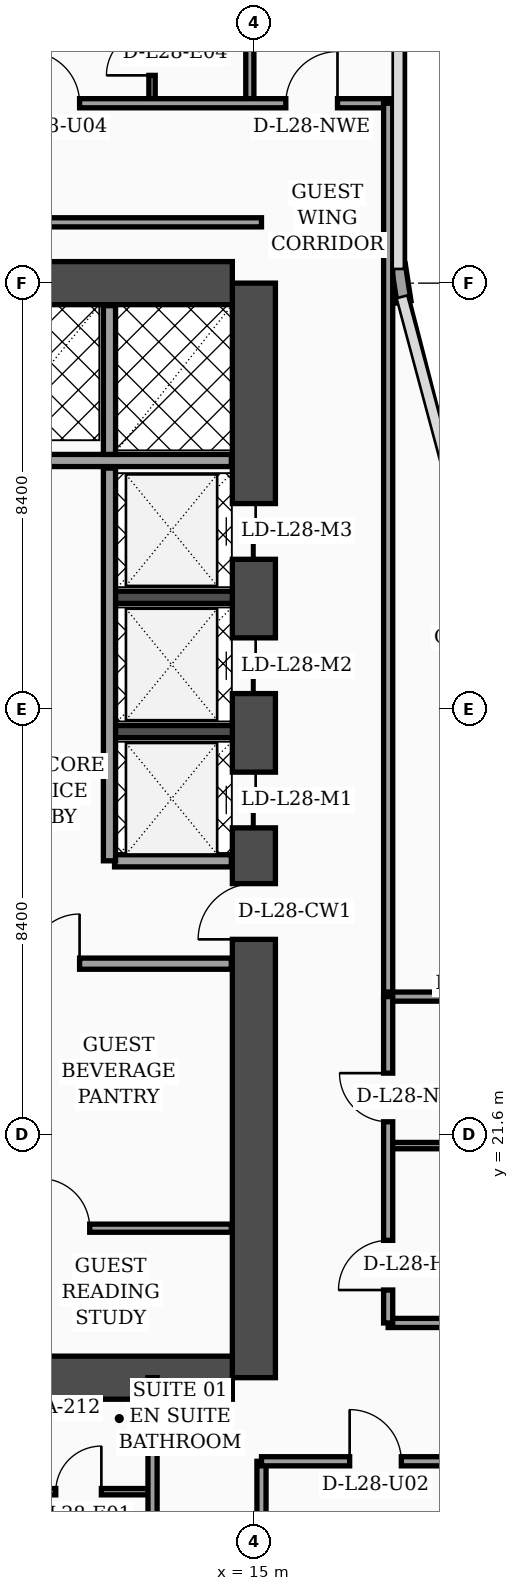
"""IFC4 building model, lengths in metres.
Left out: names, types, materials, properties, quantities, classifications, styles, units other than length and angle.
Written with IfcOpenShell. Run it as: python <this file> out.ifc"""

import sys

from ifc_helpers import new_model, si_unit, direction, frame, frame_2d, origin, place, context, subcontext, project, spatial, rectangle, extrude, element, fill, save


model = new_model("IFC4")
c1 = context("Model", 3, precision=1e-05, world=origin(), true_north=direction((0.0, 1.0)))
c2 = subcontext(c1, "Body", "Model", "MODEL_VIEW")
j1 = project(units=[si_unit("LENGTHUNIT", "METRE"), si_unit("PLANEANGLEUNIT", "RADIAN")], contexts=[c1])
p1 = place(None, origin())
s1 = spatial("IfcSite", under=j1, at=p1, CompositionType="ELEMENT")
p2 = place(p1, origin())
s2 = spatial("IfcBuilding", under=s1, at=p2, CompositionType="ELEMENT")
p3 = place(p2, frame((0.0, 0.0, 116.4)))
s3 = spatial("IfcBuildingStorey", under=s2, at=p3, CompositionType="ELEMENT", Elevation=116.4)
p4 = place(p3, frame((15.0, 16.8, 0.0), z_axis=(0.0, 0.0, 1.0), x_axis=(0.0, 1.0, 0.0)))
e1 = element("IfcWall", 1, at=p4, inside=s3, PredefinedType="SHEAR", context=c2, shape_type="SweptSolid", body=[
    extrude(rectangle(XDim=21.6, YDim=0.85, at=frame_2d((10.8, 0.0))), origin(), (0.0, 0.0, 1.0), 3.56),
])
p5 = place(p4, frame((8.65, 0.0, 0.0)))
e2 = element("IfcOpeningElement", 2, at=p5, cuts=e1, PredefinedType="OPENING", context=c2, shape_type="SweptSolid", body=[
    extrude(rectangle(XDim=1.1, YDim=2.2, at=frame_2d((0.55, 1.1))), frame((0.0, 0.435, 0.0), z_axis=(0.0, -1.0, 0.0), x_axis=(1.0, 0.0, 0.0)), (0.0, 0.0, 1.0), 0.87),
])
p6 = place(p4, frame((10.85, 0.0, 0.0)))
e3 = element("IfcOpeningElement", 3, at=p6, cuts=e1, PredefinedType="OPENING", context=c2, shape_type="SweptSolid", body=[
    extrude(rectangle(XDim=1.1, YDim=2.2, at=frame_2d((0.55, 1.1))), frame((0.0, 0.435, 0.0), z_axis=(0.0, -1.0, 0.0), x_axis=(1.0, 0.0, 0.0)), (0.0, 0.0, 1.0), 0.87),
])
p7 = place(p4, frame((13.5, 0.0, 0.0)))
e4 = element("IfcOpeningElement", 4, at=p7, cuts=e1, PredefinedType="OPENING", context=c2, shape_type="SweptSolid", body=[
    extrude(rectangle(XDim=1.1, YDim=2.2, at=frame_2d((0.55, 1.1))), frame((0.0, 0.435, 0.0), z_axis=(0.0, -1.0, 0.0), x_axis=(1.0, 0.0, 0.0)), (0.0, 0.0, 1.0), 0.87),
])
p8 = place(p4, frame((16.15, 0.0, 0.0)))
e5 = element("IfcOpeningElement", 5, at=p8, cuts=e1, PredefinedType="OPENING", context=c2, shape_type="SweptSolid", body=[
    extrude(rectangle(XDim=1.1, YDim=2.2, at=frame_2d((0.55, 1.1))), frame((0.0, 0.435, 0.0), z_axis=(0.0, -1.0, 0.0), x_axis=(1.0, 0.0, 0.0)), (0.0, 0.0, 1.0), 0.87),
])
for number, where, z_axis, x_axis in (
    (6, (4.625, 38.4, 0.0), (0.0, 0.0, 1.0), (1.0, 0.0, 0.0)),
    (7, (4.625, 16.8, 0.0), (0.0, 0.0, 1.0), (1.0, 0.0, 0.0)),
):
    element("IfcWall", number, at=place(p3, frame(where, z_axis=z_axis, x_axis=x_axis)), inside=s3, PredefinedType="SHEAR", context=c2, shape_type="SweptSolid", body=[
        extrude(rectangle(XDim=9.95, YDim=0.85, at=frame_2d((4.975, 0.0))), origin(), (0.0, 0.0, 1.0), 3.56),
    ])
for number, where, z_axis, x_axis in (
    (8, (12.18, 29.55, 0.0), (0.0, 0.0, 1.0), (1.0, 0.0, 0.0)),
    (9, (12.18, 32.2, 0.0), (0.0, 0.0, 1.0), (1.0, 0.0, 0.0)),
):
    element("IfcWall", number, at=place(p3, frame(where, z_axis=z_axis, x_axis=x_axis)), inside=s3, PredefinedType="SOLIDWALL", context=c2, shape_type="SweptSolid", body=[
        extrude(rectangle(XDim=2.395, YDim=0.24, at=frame_2d((1.198, 0.0))), origin(), (0.0, 0.0, 1.0), 3.56),
    ])
p9 = place(p3, frame((17.962, 38.03, 0.0), z_axis=(0.0, 0.0, 1.0), x_axis=(-0.15141125477, 0.988470855377, 0.0)))
e10 = element("IfcWall", 10, at=p9, inside=s3, PredefinedType="SOLIDWALL", context=c2, shape_type="SweptSolid", body=[
    extrude(rectangle(XDim=0.739, YDim=0.28, at=frame_2d((0.369, 0.0))), origin(), (0.0, 0.0, 1.0), 3.56),
])
p10 = place(p3, frame((9.68, 19.75, 0.0), z_axis=(0.0, 0.0, 1.0), x_axis=(1.0, 0.0, 0.0)))
e11 = element("IfcWall", 11, at=p10, inside=s3, PredefinedType="PARTITIONING", context=c2, shape_type="SweptSolid", body=[
    extrude(rectangle(XDim=4.875, YDim=0.16, at=frame_2d((2.438, 0.0))), origin(), (0.0, 0.0, 1.0), 3.56),
])
p11 = place(p10, frame((1.1, 0.0, 0.0)))
e12 = element("IfcOpeningElement", 12, at=p11, cuts=e11, PredefinedType="OPENING", context=c2, shape_type="SweptSolid", body=[
    extrude(rectangle(XDim=0.98, YDim=2.15, at=frame_2d((0.49, 1.075))), frame((0.0, 0.09, 0.0), z_axis=(0.0, -1.0, 0.0), x_axis=(1.0, 0.0, 0.0)), (0.0, 0.0, 1.0), 0.18),
])
p12 = place(p3, frame((9.68, 24.97, 0.0), z_axis=(0.0, 0.0, 1.0), x_axis=(1.0, 0.0, 0.0)))
e13 = element("IfcWall", 13, at=p12, inside=s3, PredefinedType="SOLIDWALL", context=c2, shape_type="SweptSolid", body=[
    extrude(rectangle(XDim=4.875, YDim=0.22, at=frame_2d((2.438, 0.0))), origin(), (0.0, 0.0, 1.0), 2.84),
])
p13 = place(p12, frame((0.9, 0.0, 0.0)))
e14 = element("IfcOpeningElement", 14, at=p13, cuts=e13, PredefinedType="OPENING", context=c2, shape_type="SweptSolid", body=[
    extrude(rectangle(XDim=0.98, YDim=2.15, at=frame_2d((0.49, 1.075))), frame((0.0, 0.12, 0.0), z_axis=(0.0, -1.0, 0.0), x_axis=(1.0, 0.0, 0.0)), (0.0, 0.0, 1.0), 0.24),
])
p14 = place(p3, frame((12.25, 27.0, 0.0), z_axis=(0.0, 0.0, 1.0), x_axis=(1.0, 0.0, 0.0)))
e15 = element("IfcWall", 15, at=p14, inside=s3, PredefinedType="SOLIDWALL", context=c2, shape_type="SweptSolid", body=[
    extrude(rectangle(XDim=2.305, YDim=0.24, at=frame_2d((1.152, 0.0))), origin(), (0.0, 0.0, 1.0), 3.56),
])
p15 = place(p3, frame((12.15, 27.0, 0.0), z_axis=(0.0, 0.0, 1.0), x_axis=(0.0, 1.0, 0.0)))
e16 = element("IfcWall", 16, at=p15, inside=s3, PredefinedType="SOLIDWALL", context=c2, shape_type="SweptSolid", body=[
    extrude(rectangle(XDim=7.75, YDim=0.24, at=frame_2d((3.875, 0.0))), origin(), (0.0, 0.0, 1.0), 3.56),
])
p16 = place(p3, frame((9.66, 34.9, 0.0), z_axis=(0.0, 0.0, 1.0), x_axis=(1.0, 0.0, 0.0)))
e17 = element("IfcWall", 17, at=p16, inside=s3, PredefinedType="SOLIDWALL", context=c2, shape_type="SweptSolid", body=[
    extrude(rectangle(XDim=4.895, YDim=0.24, at=frame_2d((2.448, 0.0))), origin(), (0.0, 0.0, 1.0), 3.56),
])
p17 = place(p3, frame((12.15, 35.02, 0.0), z_axis=(0.0, 0.0, 1.0), x_axis=(0.0, 1.0, 0.0)))
e18 = element("IfcWall", 18, at=p17, inside=s3, PredefinedType="SOLIDWALL", context=c2, shape_type="SweptSolid", body=[
    extrude(rectangle(XDim=2.935, YDim=0.24, at=frame_2d((1.468, 0.0))), origin(), (0.0, 0.0, 1.0), 3.56),
])
p18 = place(p3, frame((3.2, 14.55, 0.0), z_axis=(0.0, 0.0, 1.0), x_axis=(1.0, 0.0, 0.0)))
e19 = element("IfcWall", 19, at=p18, inside=s3, PredefinedType="PARTITIONING", context=c2, shape_type="SweptSolid", body=[
    extrude(rectangle(XDim=9.8, YDim=0.125, at=frame_2d((4.9, 0.0))), origin(), (0.0, 0.0, 1.0), 2.84),
])
p19 = place(p18, frame((3.32, 0.0, 0.0)))
e20 = element("IfcOpeningElement", 20, at=p19, cuts=e19, PredefinedType="OPENING", context=c2, shape_type="SweptSolid", body=[
    extrude(rectangle(XDim=0.96, YDim=2.2, at=frame_2d((0.48, 1.1))), frame((0.0, 0.073, 0.0), z_axis=(0.0, -1.0, 0.0), x_axis=(1.0, 0.0, 0.0)), (0.0, 0.0, 1.0), 0.145),
])
p20 = place(p18, frame((7.89, 0.0, 0.0)))
e21 = element("IfcOpeningElement", 21, at=p20, cuts=e19, PredefinedType="OPENING", context=c2, shape_type="SweptSolid", body=[
    extrude(rectangle(XDim=0.9, YDim=2.15, at=frame_2d((0.45, 1.075))), frame((0.0, 0.073, 0.0), z_axis=(0.0, -1.0, 0.0), x_axis=(1.0, 0.0, 0.0)), (0.0, 0.0, 1.0), 0.145),
])
p21 = place(p3, frame((13.0, 2.44, 0.0), z_axis=(0.0, 0.0, 1.0), x_axis=(0.0, 1.0, 0.0)))
e22 = element("IfcWall", 22, at=p21, inside=s3, PredefinedType="PARTITIONING", context=c2, shape_type="SweptSolid", body=[
    extrude(rectangle(XDim=14.36, YDim=0.18, at=frame_2d((7.18, 0.0))), origin(), (0.0, 0.0, 1.0), 2.84),
])
p22 = place(p21, frame((3.01, 0.0, 0.0)))
e23 = element("IfcOpeningElement", 23, at=p22, cuts=e22, PredefinedType="OPENING", context=c2, shape_type="SweptSolid", body=[
    extrude(rectangle(XDim=1.02, YDim=2.2, at=frame_2d((0.51, 1.1))), frame((0.0, 0.1, 0.0), z_axis=(0.0, -1.0, 0.0), x_axis=(1.0, 0.0, 0.0)), (0.0, 0.0, 1.0), 0.2),
])
p23 = place(p3, frame((15.15, 2.44, 0.0), z_axis=(0.0, 0.0, 1.0), x_axis=(0.0, 1.0, 0.0)))
e24 = element("IfcWall", 24, at=p23, inside=s3, PredefinedType="PARTITIONING", context=c2, shape_type="SweptSolid", body=[
    extrude(rectangle(XDim=12.71, YDim=0.18, at=frame_2d((6.355, 0.0))), origin(), (0.0, 0.0, 1.0), 3.04),
])
p24 = place(p3, frame((15.15, 15.15, 0.0), z_axis=(0.0, 0.0, 1.0), x_axis=(1.0, 0.0, 0.0)))
e25 = element("IfcWall", 25, at=p24, inside=s3, PredefinedType="PARTITIONING", context=c2, shape_type="SweptSolid", body=[
    extrude(rectangle(XDim=6.45, YDim=0.18, at=frame_2d((3.225, 0.0))), origin(), (0.0, 0.0, 1.0), 2.49),
])
p25 = place(p24, frame((1.74, 0.0, 0.0)))
e26 = element("IfcOpeningElement", 26, at=p25, cuts=e25, PredefinedType="OPENING", context=c2, shape_type="SweptSolid", body=[
    extrude(rectangle(XDim=1.02, YDim=2.2, at=frame_2d((0.51, 1.1))), frame((0.0, 0.1, 0.0), z_axis=(0.0, -1.0, 0.0), x_axis=(1.0, 0.0, 0.0)), (0.0, 0.0, 1.0), 0.2),
])
p26 = place(p3, frame((14.92, 41.95, 0.0), z_axis=(0.0, 0.0, 1.0), x_axis=(0.0, 1.0, 0.0)))
e27 = element("IfcWall", 27, at=p26, inside=s3, PredefinedType="PARTITIONING", context=c2, shape_type="SweptSolid", body=[
    extrude(rectangle(XDim=5.85, YDim=0.16, at=frame_2d((2.925, 0.0))), origin(), (0.0, 0.0, 1.0), 3.04),
])
p27 = place(p3, frame((12.99, 41.95, 0.0), z_axis=(0.0, 0.0, 1.0), x_axis=(0.0, 1.0, 0.0)))
e28 = element("IfcWall", 28, at=p27, inside=s3, PredefinedType="PARTITIONING", context=c2, shape_type="SweptSolid", body=[
    extrude(rectangle(XDim=8.99, YDim=0.125, at=frame_2d((4.495, 0.0))), origin(), (0.0, 0.0, 1.0), 3.04),
])
p28 = place(p27, frame((0.55, 0.0, 0.0)))
e29 = element("IfcOpeningElement", 29, at=p28, cuts=e28, PredefinedType="OPENING", context=c2, shape_type="SweptSolid", body=[
    extrude(rectangle(XDim=0.9, YDim=2.15, at=frame_2d((0.45, 1.075))), frame((0.0, 0.073, 0.0), z_axis=(0.0, -1.0, 0.0), x_axis=(1.0, 0.0, 0.0)), (0.0, 0.0, 1.0), 0.145),
])
p29 = place(p27, frame((3.62, 0.0, 0.0)))
e30 = element("IfcOpeningElement", 30, at=p29, cuts=e28, PredefinedType="OPENING", context=c2, shape_type="SweptSolid", body=[
    extrude(rectangle(XDim=0.96, YDim=2.2, at=frame_2d((0.48, 1.1))), frame((0.0, 0.073, 0.0), z_axis=(0.0, -1.0, 0.0), x_axis=(1.0, 0.0, 0.0)), (0.0, 0.0, 1.0), 0.145),
])
p30 = place(p3, frame((0.08, 41.95, 0.0), z_axis=(0.0, 0.0, 1.0), x_axis=(1.0, 0.0, 0.0)))
e31 = element("IfcWall", 31, at=p30, inside=s3, PredefinedType="PARTITIONING", context=c2, shape_type="SweptSolid", body=[
    extrude(rectangle(XDim=17.77, YDim=0.18, at=frame_2d((8.885, 0.0))), origin(), (0.0, 0.0, 1.0), 2.84),
])
p31 = place(p30, frame((0.9, 0.0, 0.0)))
e32 = element("IfcOpeningElement", 32, at=p31, cuts=e31, PredefinedType="OPENING", context=c2, shape_type="SweptSolid", body=[
    extrude(rectangle(XDim=1.02, YDim=2.2, at=frame_2d((0.51, 1.1))), frame((0.0, 0.1, 0.0), z_axis=(0.0, -1.0, 0.0), x_axis=(1.0, 0.0, 0.0)), (0.0, 0.0, 1.0), 0.2),
])
p32 = place(p30, frame((4.57, 0.0, 0.0)))
e33 = element("IfcOpeningElement", 33, at=p32, cuts=e31, PredefinedType="OPENING", context=c2, shape_type="SweptSolid", body=[
    extrude(rectangle(XDim=1.02, YDim=2.2, at=frame_2d((0.51, 1.1))), frame((0.0, 0.1, 0.0), z_axis=(0.0, -1.0, 0.0), x_axis=(1.0, 0.0, 0.0)), (0.0, 0.0, 1.0), 0.2),
])
p33 = place(p30, frame((10.46, 0.0, 0.0)))
e34 = element("IfcOpeningElement", 34, at=p33, cuts=e31, PredefinedType="OPENING", context=c2, shape_type="SweptSolid", body=[
    extrude(rectangle(XDim=1.02, YDim=2.2, at=frame_2d((0.51, 1.1))), frame((0.0, 0.1, 0.0), z_axis=(0.0, -1.0, 0.0), x_axis=(1.0, 0.0, 0.0)), (0.0, 0.0, 1.0), 0.2),
])
p34 = place(p30, frame((15.55, 0.0, 0.0)))
e35 = element("IfcOpeningElement", 35, at=p34, cuts=e31, PredefinedType="OPENING", context=c2, shape_type="SweptSolid", body=[
    extrude(rectangle(XDim=1.02, YDim=2.2, at=frame_2d((0.51, 1.1))), frame((0.0, 0.1, 0.0), z_axis=(0.0, -1.0, 0.0), x_axis=(1.0, 0.0, 0.0)), (0.0, 0.0, 1.0), 0.2),
])
p35 = place(p3, frame((17.65, 24.3, 0.0), z_axis=(0.0, 0.0, 1.0), x_axis=(0.0, 1.0, 0.0)))
e36 = element("IfcWall", 36, at=p35, inside=s3, PredefinedType="PARTITIONING", context=c2, shape_type="SweptSolid", body=[
    extrude(rectangle(XDim=17.65, YDim=0.18, at=frame_2d((8.825, 0.0))), origin(), (0.0, 0.0, 1.0), 2.84),
])
p36 = place(p3, frame((3.755, 39.6, 0.0), z_axis=(0.0, 0.0, 1.0), x_axis=(1.0, 0.0, 0.0)))
e37 = element("IfcWall", 37, at=p36, inside=s3, PredefinedType="PARTITIONING", context=c2, shape_type="SweptSolid", body=[
    extrude(rectangle(XDim=11.395, YDim=0.18, at=frame_2d((5.698, 0.0))), origin(), (0.0, 0.0, 1.0), 2.84),
])
p37 = place(p3, frame((17.65, 17.88, 0.0), z_axis=(0.0, 0.0, 1.0), x_axis=(1.0, 0.0, 0.0)))
e38 = element("IfcWall", 38, at=p37, inside=s3, PredefinedType="PARTITIONING", context=c2, shape_type="SweptSolid", body=[
    extrude(rectangle(XDim=3.9, YDim=0.18, at=frame_2d((1.95, 0.0))), origin(), (0.0, 0.0, 1.0), 3.56),
])
p38 = place(p3, frame((17.65, 21.38, 0.0), z_axis=(0.0, 0.0, 1.0), x_axis=(1.0, 0.0, 0.0)))
e39 = element("IfcWall", 39, at=p38, inside=s3, PredefinedType="PARTITIONING", context=c2, shape_type="SweptSolid", body=[
    extrude(rectangle(XDim=3.9, YDim=0.125, at=frame_2d((1.95, 0.0))), origin(), (0.0, 0.0, 1.0), 3.56),
])
p39 = place(p3, frame((17.65, 24.32, 0.0), z_axis=(0.0, 0.0, 1.0), x_axis=(1.0, 0.0, 0.0)))
e40 = element("IfcWall", 40, at=p39, inside=s3, PredefinedType="PARTITIONING", context=c2, shape_type="SweptSolid", body=[
    extrude(rectangle(XDim=3.95, YDim=0.18, at=frame_2d((1.975, 0.0))), origin(), (0.0, 0.0, 1.0), 3.56),
])
p40 = place(p3, frame((17.65, 17.88, 0.0), z_axis=(0.0, 0.0, 1.0), x_axis=(0.0, 1.0, 0.0)))
e41 = element("IfcWall", 41, at=p40, inside=s3, PredefinedType="PARTITIONING", context=c2, shape_type="SweptSolid", body=[
    extrude(rectangle(XDim=6.44, YDim=0.18, at=frame_2d((3.22, 0.0))), origin(), (0.0, 0.0, 1.0), 3.56),
])
p41 = place(p40, frame((0.65, 0.0, 0.0)))
e42 = element("IfcOpeningElement", 42, at=p41, cuts=e41, PredefinedType="OPENING", context=c2, shape_type="SweptSolid", body=[
    extrude(rectangle(XDim=0.98, YDim=2.15, at=frame_2d((0.49, 1.075))), frame((0.0, 0.1, 0.0), z_axis=(0.0, -1.0, 0.0), x_axis=(1.0, 0.0, 0.0)), (0.0, 0.0, 1.0), 0.2),
])
p42 = place(p40, frame((3.97, 0.0, 0.0)))
e43 = element("IfcOpeningElement", 43, at=p42, cuts=e41, PredefinedType="OPENING", context=c2, shape_type="SweptSolid", body=[
    extrude(rectangle(XDim=0.96, YDim=2.2, at=frame_2d((0.48, 1.1))), frame((0.0, 0.1, 0.0), z_axis=(0.0, -1.0, 0.0), x_axis=(1.0, 0.0, 0.0)), (0.0, 0.0, 1.0), 0.2),
])
p43 = place(p11, origin())
e44 = element("IfcDoor", 44, at=p43, inside=s3, OperationType="SINGLE_SWING_LEFT", PredefinedType="DOOR", context=c2, shape_type="SweptSolid", body=[
    extrude(rectangle(XDim=0.98, YDim=2.15, at=frame_2d((0.49, 1.075))), frame((0.0, 0.025, 0.0), z_axis=(0.0, -1.0, 0.0), x_axis=(1.0, 0.0, 0.0)), (0.0, 0.0, 1.0), 0.05),
])
fill(e12, e44)
p44 = place(p13, origin())
e45 = element("IfcDoor", 45, at=p44, inside=s3, OperationType="SINGLE_SWING_RIGHT", PredefinedType="DOOR", context=c2, shape_type="SweptSolid", body=[
    extrude(rectangle(XDim=0.98, YDim=2.15, at=frame_2d((0.49, 1.075))), frame((0.0, 0.025, 0.0), z_axis=(0.0, -1.0, 0.0), x_axis=(1.0, 0.0, 0.0)), (0.0, 0.0, 1.0), 0.05),
])
fill(e14, e45)
p45 = place(p20, origin())
e46 = element("IfcDoor", 46, at=p45, inside=s3, OperationType="SINGLE_SWING_RIGHT", PredefinedType="DOOR", context=c2, shape_type="SweptSolid", body=[
    extrude(rectangle(XDim=0.9, YDim=2.15, at=frame_2d((0.45, 1.075))), frame((0.0, 0.025, 0.0), z_axis=(0.0, -1.0, 0.0), x_axis=(1.0, 0.0, 0.0)), (0.0, 0.0, 1.0), 0.05),
])
fill(e21, e46)
p46 = place(p25, origin())
e47 = element("IfcDoor", 47, at=p46, inside=s3, OperationType="SINGLE_SWING_LEFT", PredefinedType="DOOR", context=c2, shape_type="SweptSolid", body=[
    extrude(rectangle(XDim=1.02, YDim=2.2, at=frame_2d((0.51, 1.1))), frame((0.0, 0.025, 0.0), z_axis=(0.0, -1.0, 0.0), x_axis=(1.0, 0.0, 0.0)), (0.0, 0.0, 1.0), 0.05),
])
fill(e26, e47)
p47 = place(p28, origin())
e48 = element("IfcDoor", 48, at=p47, inside=s3, OperationType="SINGLE_SWING_LEFT", PredefinedType="DOOR", context=c2, shape_type="SweptSolid", body=[
    extrude(rectangle(XDim=0.9, YDim=2.15, at=frame_2d((0.45, 1.075))), frame((0.0, 0.025, 0.0), z_axis=(0.0, -1.0, 0.0), x_axis=(1.0, 0.0, 0.0)), (0.0, 0.0, 1.0), 0.05),
])
fill(e29, e48)
p48 = place(p33, origin())
e49 = element("IfcDoor", 49, at=p48, inside=s3, OperationType="SINGLE_SWING_LEFT", PredefinedType="DOOR", context=c2, shape_type="SweptSolid", body=[
    extrude(rectangle(XDim=1.02, YDim=2.2, at=frame_2d((0.51, 1.1))), frame((0.0, 0.025, 0.0), z_axis=(0.0, -1.0, 0.0), x_axis=(1.0, 0.0, 0.0)), (0.0, 0.0, 1.0), 0.05),
])
fill(e34, e49)
p49 = place(p34, origin())
e50 = element("IfcDoor", 50, at=p49, inside=s3, OperationType="SINGLE_SWING_RIGHT", PredefinedType="DOOR", context=c2, shape_type="SweptSolid", body=[
    extrude(rectangle(XDim=1.02, YDim=2.2, at=frame_2d((0.51, 1.1))), frame((0.0, 0.025, 0.0), z_axis=(0.0, -1.0, 0.0), x_axis=(1.0, 0.0, 0.0)), (0.0, 0.0, 1.0), 0.05),
])
fill(e35, e50)
p50 = place(p41, origin())
e51 = element("IfcDoor", 51, at=p50, inside=s3, OperationType="SINGLE_SWING_LEFT", PredefinedType="DOOR", context=c2, shape_type="SweptSolid", body=[
    extrude(rectangle(XDim=0.98, YDim=2.15, at=frame_2d((0.49, 1.075))), frame((0.0, 0.025, 0.0), z_axis=(0.0, -1.0, 0.0), x_axis=(1.0, 0.0, 0.0)), (0.0, 0.0, 1.0), 0.05),
])
fill(e42, e51)
p51 = place(p42, origin())
e52 = element("IfcDoor", 52, at=p51, inside=s3, OperationType="SINGLE_SWING_RIGHT", PredefinedType="DOOR", context=c2, shape_type="SweptSolid", body=[
    extrude(rectangle(XDim=0.96, YDim=2.2, at=frame_2d((0.48, 1.1))), frame((0.0, 0.025, 0.0), z_axis=(0.0, -1.0, 0.0), x_axis=(1.0, 0.0, 0.0)), (0.0, 0.0, 1.0), 0.05),
])
fill(e43, e52)
p52 = place(p5, origin())
e53 = element("IfcDoor", 53, at=p52, inside=s3, OperationType="SINGLE_SWING_LEFT", PredefinedType="DOOR", context=c2, shape_type="SweptSolid", body=[
    extrude(rectangle(XDim=1.1, YDim=2.2, at=frame_2d((0.55, 1.1))), frame((0.0, 0.025, 0.0), z_axis=(0.0, -1.0, 0.0), x_axis=(1.0, 0.0, 0.0)), (0.0, 0.0, 1.0), 0.05),
])
fill(e2, e53)
p53 = place(p6, origin())
e54 = element("IfcDoor", 54, at=p53, inside=s3, OperationType="DOUBLE_DOOR_SLIDING", PredefinedType="DOOR", context=c2, shape_type="SweptSolid", body=[
    extrude(rectangle(XDim=1.1, YDim=2.2, at=frame_2d((0.55, 1.1))), frame((0.0, 0.025, 0.0), z_axis=(0.0, -1.0, 0.0), x_axis=(1.0, 0.0, 0.0)), (0.0, 0.0, 1.0), 0.05),
])
fill(e3, e54)
p54 = place(p7, origin())
e55 = element("IfcDoor", 55, at=p54, inside=s3, OperationType="DOUBLE_DOOR_SLIDING", PredefinedType="DOOR", context=c2, shape_type="SweptSolid", body=[
    extrude(rectangle(XDim=1.1, YDim=2.2, at=frame_2d((0.55, 1.1))), frame((0.0, 0.025, 0.0), z_axis=(0.0, -1.0, 0.0), x_axis=(1.0, 0.0, 0.0)), (0.0, 0.0, 1.0), 0.05),
])
fill(e4, e55)
p55 = place(p8, origin())
e56 = element("IfcDoor", 56, at=p55, inside=s3, OperationType="DOUBLE_DOOR_SLIDING", PredefinedType="DOOR", context=c2, shape_type="SweptSolid", body=[
    extrude(rectangle(XDim=1.1, YDim=2.2, at=frame_2d((0.55, 1.1))), frame((0.0, 0.025, 0.0), z_axis=(0.0, -1.0, 0.0), x_axis=(1.0, 0.0, 0.0)), (0.0, 0.0, 1.0), 0.05),
])
fill(e5, e56)
save(model, sys.argv[1])
